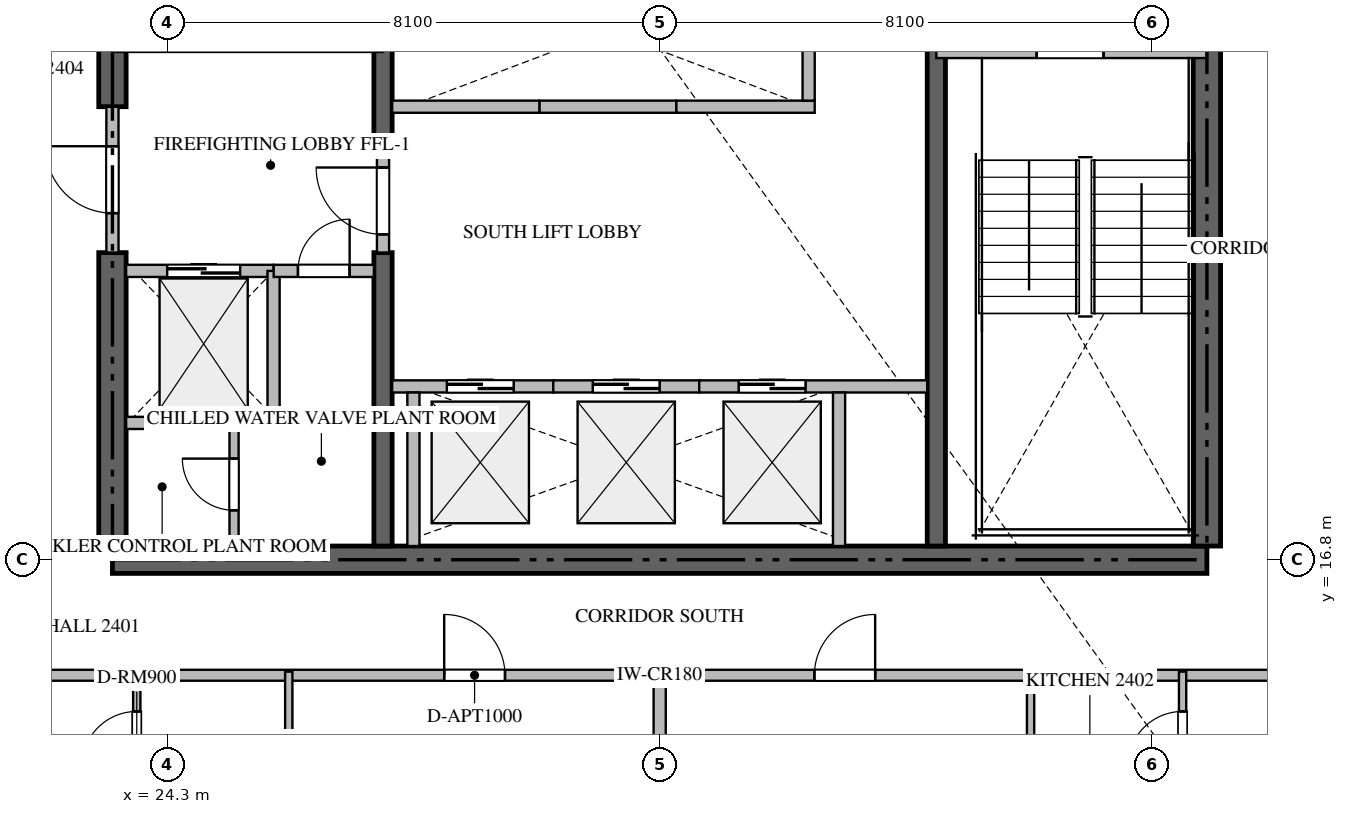
"""IFC4 building model, lengths in metres.
Left out: names, types, materials, properties, quantities, classifications, styles, units other than length and angle.
Written with IfcOpenShell. Run it as: python <this file> out.ifc"""

import sys

from ifc_helpers import new_model, si_unit, direction, frame, frame_2d, origin, place, context, subcontext, project, spatial, rectangle, extrude, source, transform, mapped, element, fill, save


model = new_model("IFC4")
c1 = context("Model", 3, precision=1e-05, world=origin(), true_north=direction((0.0, 1.0)))
c2 = subcontext(c1, "Body", "Model", "MODEL_VIEW")
j1 = project(units=[si_unit("LENGTHUNIT", "METRE"), si_unit("PLANEANGLEUNIT", "RADIAN")], contexts=[c1])
p1 = place(None, origin())
s1 = spatial("IfcSite", under=j1, at=p1, CompositionType="ELEMENT")
p2 = place(p1, origin())
s2 = spatial("IfcBuilding", under=s1, at=p2, CompositionType="ELEMENT")
p3 = place(p2, frame((0.0, 0.0, 97.95)))
s3 = spatial("IfcBuildingStorey", under=s2, at=p3, CompositionType="ELEMENT", Elevation=97.95)
p4 = place(p3, frame((23.4, 16.8, -0.26), z_axis=(0.0, 0.0, 1.0), x_axis=(1.0, 0.0, 0.0)))
e1 = element("IfcWall", 1, at=p4, inside=s3, PredefinedType="SHEAR", context=c2, shape_type="SweptSolid", body=[
    extrude(rectangle(XDim=18.0, YDim=0.45, at=frame_2d((9.0, 0.0))), origin(), (0.0, 0.0, 1.0), 3.748),
])
p5 = place(p3, frame((23.4, 17.025, -0.26), z_axis=(0.0, 0.0, 1.0), x_axis=(0.0, 1.0, 0.0)))
e2 = element("IfcWall", 2, at=p5, inside=s3, PredefinedType="SHEAR", context=c2, shape_type="SweptSolid", body=[
    extrude(rectangle(XDim=4.825, YDim=0.45, at=frame_2d((2.413, 0.0))), origin(), (0.0, 0.0, 1.0), 3.748),
])
p6 = place(p3, frame((23.4, 24.25, -0.26), z_axis=(0.0, 0.0, 1.0), x_axis=(0.0, 1.0, 0.0)))
e3 = element("IfcWall", 3, at=p6, inside=s3, PredefinedType="SHEAR", context=c2, shape_type="SweptSolid", body=[
    extrude(rectangle(XDim=9.125, YDim=0.45, at=frame_2d((4.562, 0.0))), origin(), (0.0, 0.0, 1.0), 3.748),
])
p7 = place(p3, frame((41.4, 17.025, -0.26), z_axis=(0.0, 0.0, 1.0), x_axis=(0.0, 1.0, 0.0)))
e4 = element("IfcWall", 4, at=p7, inside=s3, PredefinedType="SHEAR", context=c2, shape_type="SweptSolid", body=[
    extrude(rectangle(XDim=8.325, YDim=0.45, at=frame_2d((4.163, 0.0))), origin(), (0.0, 0.0, 1.0), 3.748),
])
p8 = place(p3, frame((27.85, 17.025, -0.26), z_axis=(0.0, 0.0, 1.0), x_axis=(0.0, 1.0, 0.0)))
e5 = element("IfcWall", 5, at=p8, inside=s3, PredefinedType="SHEAR", context=c2, shape_type="SweptSolid", body=[
    extrude(rectangle(XDim=4.825, YDim=0.3, at=frame_2d((2.413, 0.0))), origin(), (0.0, 0.0, 1.0), 3.748),
])
p9 = place(p3, frame((27.85, 23.55, -0.26), z_axis=(0.0, 0.0, 1.0), x_axis=(0.0, 1.0, 0.0)))
e6 = element("IfcWall", 6, at=p9, inside=s3, PredefinedType="SHEAR", context=c2, shape_type="SweptSolid", body=[
    extrude(rectangle(XDim=9.825, YDim=0.3, at=frame_2d((4.913, 0.0))), origin(), (0.0, 0.0, 1.0), 3.748),
])
p10 = place(p3, frame((36.95, 17.025, -0.26), z_axis=(0.0, 0.0, 1.0), x_axis=(0.0, 1.0, 0.0)))
e7 = element("IfcWall", 7, at=p10, inside=s3, PredefinedType="SHEAR", context=c2, shape_type="SweptSolid", body=[
    extrude(rectangle(XDim=8.325, YDim=0.3, at=frame_2d((4.163, 0.0))), origin(), (0.0, 0.0, 1.0), 3.748),
])
p11 = place(p3, frame((36.95, 25.15, 0.0), z_axis=(0.0, 0.0, 1.0), x_axis=(1.0, 0.0, 0.0)))
e8 = element("IfcWall", 8, at=p11, inside=s3, PredefinedType="STANDARD", context=c2, shape_type="SweptSolid", body=[
    extrude(rectangle(XDim=4.45, YDim=0.2, at=frame_2d((2.225, 0.0))), origin(), (0.0, 0.0, 1.0), 3.49),
])
p12 = place(p11, frame((1.65, 0.0, 0.0)))
e9 = element("IfcOpeningElement", 9, at=p12, cuts=e8, PredefinedType="OPENING", context=c2, shape_type="SweptSolid", body=[
    extrude(rectangle(XDim=1.1, YDim=2.15, at=frame_2d((0.55, 1.075))), frame((0.0, 0.11, 0.0), z_axis=(0.0, -1.0, 0.0), x_axis=(1.0, 0.0, 0.0)), (0.0, 0.0, 1.0), 0.22),
])
p13 = place(p3, frame((23.625, 21.55, 0.0), z_axis=(0.0, 0.0, 1.0), x_axis=(1.0, 0.0, 0.0)))
e10 = element("IfcWall", 10, at=p13, inside=s3, PredefinedType="STANDARD", context=c2, shape_type="SweptSolid", body=[
    extrude(rectangle(XDim=2.425, YDim=0.2, at=frame_2d((1.212, 0.0))), origin(), (0.0, 0.0, 1.0), 3.49),
])
p14 = place(p13, frame((0.675, 0.0, 0.0)))
e11 = element("IfcOpeningElement", 11, at=p14, cuts=e10, PredefinedType="OPENING", context=c2, shape_type="SweptSolid", body=[
    extrude(rectangle(XDim=1.2, YDim=2.2, at=frame_2d((0.6, 1.1))), frame((0.0, 0.11, 0.0), z_axis=(0.0, -1.0, 0.0), x_axis=(1.0, 0.0, 0.0)), (0.0, 0.0, 1.0), 0.22),
])
p15 = place(p3, frame((28.0, 19.65, 0.0), z_axis=(0.0, 0.0, 1.0), x_axis=(1.0, 0.0, 0.0)))
e12 = element("IfcWall", 12, at=p15, inside=s3, PredefinedType="STANDARD", context=c2, shape_type="SweptSolid", body=[
    extrude(rectangle(XDim=2.65, YDim=0.2, at=frame_2d((1.325, 0.0))), origin(), (0.0, 0.0, 1.0), 3.49),
])
p16 = place(p15, frame((0.9, 0.0, 0.0)))
e13 = element("IfcOpeningElement", 13, at=p16, cuts=e12, PredefinedType="OPENING", context=c2, shape_type="SweptSolid", body=[
    extrude(rectangle(XDim=1.1, YDim=2.2, at=frame_2d((0.55, 1.1))), frame((0.0, 0.11, 0.0), z_axis=(0.0, -1.0, 0.0), x_axis=(1.0, 0.0, 0.0)), (0.0, 0.0, 1.0), 0.22),
])
p17 = place(p3, frame((28.35, 17.025, 0.0), z_axis=(0.0, 0.0, 1.0), x_axis=(0.0, 1.0, 0.0)))
e14 = element("IfcWall", 14, at=p17, inside=s3, PredefinedType="STANDARD", context=c2, shape_type="SweptSolid", body=[
    extrude(rectangle(XDim=2.525, YDim=0.2, at=frame_2d((1.263, 0.0))), origin(), (0.0, 0.0, 1.0), 3.49),
])
p18 = place(p3, frame((30.65, 19.65, 0.0), z_axis=(0.0, 0.0, 1.0), x_axis=(1.0, 0.0, 0.0)))
e15 = element("IfcWall", 15, at=p18, inside=s3, PredefinedType="STANDARD", context=c2, shape_type="SweptSolid", body=[
    extrude(rectangle(XDim=2.4, YDim=0.2, at=frame_2d((1.2, 0.0))), origin(), (0.0, 0.0, 1.0), 3.49),
])
p19 = place(p18, frame((0.65, 0.0, 0.0)))
e16 = element("IfcOpeningElement", 16, at=p19, cuts=e15, PredefinedType="OPENING", context=c2, shape_type="SweptSolid", body=[
    extrude(rectangle(XDim=1.1, YDim=2.2, at=frame_2d((0.55, 1.1))), frame((0.0, 0.11, 0.0), z_axis=(0.0, -1.0, 0.0), x_axis=(1.0, 0.0, 0.0)), (0.0, 0.0, 1.0), 0.22),
])
p20 = place(p3, frame((33.05, 19.65, 0.0), z_axis=(0.0, 0.0, 1.0), x_axis=(1.0, 0.0, 0.0)))
e17 = element("IfcWall", 17, at=p20, inside=s3, PredefinedType="STANDARD", context=c2, shape_type="SweptSolid", body=[
    extrude(rectangle(XDim=3.75, YDim=0.2, at=frame_2d((1.875, 0.0))), origin(), (0.0, 0.0, 1.0), 3.49),
])
p21 = place(p20, frame((0.65, 0.0, 0.0)))
e18 = element("IfcOpeningElement", 18, at=p21, cuts=e17, PredefinedType="OPENING", context=c2, shape_type="SweptSolid", body=[
    extrude(rectangle(XDim=1.1, YDim=2.2, at=frame_2d((0.55, 1.1))), frame((0.0, 0.11, 0.0), z_axis=(0.0, -1.0, 0.0), x_axis=(1.0, 0.0, 0.0)), (0.0, 0.0, 1.0), 0.22),
])
p22 = place(p3, frame((35.35, 17.025, 0.0), z_axis=(0.0, 0.0, 1.0), x_axis=(0.0, 1.0, 0.0)))
e19 = element("IfcWall", 19, at=p22, inside=s3, PredefinedType="STANDARD", context=c2, shape_type="SweptSolid", body=[
    extrude(rectangle(XDim=2.525, YDim=0.2, at=frame_2d((1.263, 0.0))), origin(), (0.0, 0.0, 1.0), 3.49),
])
p23 = place(p3, frame((28.0, 24.25, 0.0), z_axis=(0.0, 0.0, 1.0), x_axis=(1.0, 0.0, 0.0)))
e20 = element("IfcWall", 20, at=p23, inside=s3, PredefinedType="STANDARD", context=c2, shape_type="SweptSolid", body=[
    extrude(rectangle(XDim=2.425, YDim=0.2, at=frame_2d((1.212, 0.0))), origin(), (0.0, 0.0, 1.0), 3.49),
])
p24 = place(p3, frame((30.425, 24.25, 0.0), z_axis=(0.0, 0.0, 1.0), x_axis=(1.0, 0.0, 0.0)))
e21 = element("IfcWall", 21, at=p24, inside=s3, PredefinedType="STANDARD", context=c2, shape_type="SweptSolid", body=[
    extrude(rectangle(XDim=2.25, YDim=0.2, at=frame_2d((1.125, 0.0))), origin(), (0.0, 0.0, 1.0), 3.49),
])
p25 = place(p3, frame((32.675, 24.25, 0.0), z_axis=(0.0, 0.0, 1.0), x_axis=(1.0, 0.0, 0.0)))
e22 = element("IfcWall", 22, at=p25, inside=s3, PredefinedType="STANDARD", context=c2, shape_type="SweptSolid", body=[
    extrude(rectangle(XDim=2.275, YDim=0.2, at=frame_2d((1.137, 0.0))), origin(), (0.0, 0.0, 1.0), 3.49),
])
for number, where, z_axis, x_axis in (
    (23, (34.85, 24.35, 0.0), (0.0, 0.0, 1.0), (0.0, 1.0, 0.0)),
    (24, (26.05, 19.05, 0.0), (0.0, 0.0, 1.0), (0.0, 1.0, 0.0)),
):
    element("IfcWall", number, at=place(p3, frame(where, z_axis=z_axis, x_axis=x_axis)), inside=s3, PredefinedType="STANDARD", context=c2, shape_type="SweptSolid", body=[
        extrude(rectangle(XDim=2.5, YDim=0.2, at=frame_2d((1.25, 0.0))), origin(), (0.0, 0.0, 1.0), 3.49),
    ])
p26 = place(p3, frame((23.625, 19.05, 0.0), z_axis=(0.0, 0.0, 1.0), x_axis=(1.0, 0.0, 0.0)))
e25 = element("IfcWall", 25, at=p26, inside=s3, PredefinedType="STANDARD", context=c2, shape_type="SweptSolid", body=[
    extrude(rectangle(XDim=2.425, YDim=0.2, at=frame_2d((1.212, 0.0))), origin(), (0.0, 0.0, 1.0), 3.49),
])
p27 = place(p3, frame((26.052, 21.55, 0.0), z_axis=(0.0, 0.0, 1.0), x_axis=(1.0, 0.0, 0.0)))
e26 = element("IfcWall", 26, at=p27, inside=s3, PredefinedType="STANDARD", context=c2, shape_type="SweptSolid", body=[
    extrude(rectangle(XDim=1.648, YDim=0.2, at=frame_2d((0.824, 0.0))), origin(), (0.0, 0.0, 1.0), 3.49),
])
p28 = place(p27, frame((0.399, 0.0, 0.0)))
e27 = element("IfcOpeningElement", 27, at=p28, cuts=e26, PredefinedType="OPENING", context=c2, shape_type="SweptSolid", body=[
    extrude(rectangle(XDim=0.85, YDim=2.1, at=frame_2d((0.425, 1.05))), frame((0.0, 0.11, 0.0), z_axis=(0.0, -1.0, 0.0), x_axis=(1.0, 0.0, 0.0)), (0.0, 0.0, 1.0), 0.22),
])
p29 = place(p3, frame((23.4, 21.852, 0.0), z_axis=(0.0, 0.0, 1.0), x_axis=(0.0, 1.0, 0.0)))
e28 = element("IfcWall", 28, at=p29, inside=s3, PredefinedType="STANDARD", context=c2, shape_type="SweptSolid", body=[
    extrude(rectangle(XDim=2.396, YDim=0.2, at=frame_2d((1.198, 0.0))), origin(), (0.0, 0.0, 1.0), 3.49),
])
p30 = place(p29, frame((0.648, 0.0, 0.0)))
e29 = element("IfcOpeningElement", 29, at=p30, cuts=e28, PredefinedType="OPENING", context=c2, shape_type="SweptSolid", body=[
    extrude(rectangle(XDim=1.1, YDim=2.15, at=frame_2d((0.55, 1.075))), frame((0.0, 0.11, 0.0), z_axis=(0.0, -1.0, 0.0), x_axis=(1.0, 0.0, 0.0)), (0.0, 0.0, 1.0), 0.22),
])
p31 = place(p3, frame((27.85, 21.852, 0.0), z_axis=(0.0, 0.0, 1.0), x_axis=(0.0, 1.0, 0.0)))
e30 = element("IfcWall", 30, at=p31, inside=s3, PredefinedType="STANDARD", context=c2, shape_type="SweptSolid", body=[
    extrude(rectangle(XDim=1.696, YDim=0.2, at=frame_2d((0.848, 0.0))), origin(), (0.0, 0.0, 1.0), 3.49),
])
p32 = place(p31, frame((0.298, 0.0, 0.0)))
e31 = element("IfcOpeningElement", 31, at=p32, cuts=e30, PredefinedType="OPENING", context=c2, shape_type="SweptSolid", body=[
    extrude(rectangle(XDim=1.1, YDim=2.15, at=frame_2d((0.55, 1.075))), frame((0.0, 0.11, 0.0), z_axis=(0.0, -1.0, 0.0), x_axis=(1.0, 0.0, 0.0)), (0.0, 0.0, 1.0), 0.22),
])
p33 = place(p3, frame((25.4, 17.025, 0.0), z_axis=(0.0, 0.0, 1.0), x_axis=(0.0, 1.0, 0.0)))
e32 = element("IfcWall", 32, at=p33, inside=s3, PredefinedType="PARTITIONING", context=c2, shape_type="SweptSolid", body=[
    extrude(rectangle(XDim=2.025, YDim=0.15, at=frame_2d((1.013, 0.0))), origin(), (0.0, 0.0, 1.0), 3.49),
])
p34 = place(p33, frame((0.588, 0.0, 0.0)))
e33 = element("IfcOpeningElement", 33, at=p34, cuts=e32, PredefinedType="OPENING", context=c2, shape_type="SweptSolid", body=[
    extrude(rectangle(XDim=0.85, YDim=2.1, at=frame_2d((0.425, 1.05))), frame((0.0, 0.085, 0.0), z_axis=(0.0, -1.0, 0.0), x_axis=(1.0, 0.0, 0.0)), (0.0, 0.0, 1.0), 0.17),
])
p35 = place(p3, frame((32.4, 0.282, 0.0), z_axis=(0.0, 0.0, 1.0), x_axis=(0.0, 1.0, 0.0)))
e34 = element("IfcWall", 34, at=p35, inside=s3, PredefinedType="PARTITIONING", context=c2, shape_type="SweptSolid", body=[
    extrude(rectangle(XDim=14.618, YDim=0.2, at=frame_2d((7.309, 0.0))), origin(), (0.0, 0.0, 1.0), 3.49),
])
p36 = place(p3, frame((21.402, 14.9, 0.0), z_axis=(0.0, 0.0, 1.0), x_axis=(1.0, 0.0, 0.0)))
e35 = element("IfcWall", 35, at=p36, inside=s3, PredefinedType="PARTITIONING", context=c2, shape_type="SweptSolid", body=[
    extrude(rectangle(XDim=21.996, YDim=0.18, at=frame_2d((10.998, 0.0))), origin(), (0.0, 0.0, 1.0), 3.49),
])
p37 = place(p36, frame((7.454, 0.0, 0.0)))
e36 = element("IfcOpeningElement", 36, at=p37, cuts=e35, PredefinedType="OPENING", context=c2, shape_type="SweptSolid", body=[
    extrude(rectangle(XDim=1.0, YDim=2.15, at=frame_2d((0.5, 1.075))), frame((0.0, 0.1, 0.0), z_axis=(0.0, -1.0, 0.0), x_axis=(1.0, 0.0, 0.0)), (0.0, 0.0, 1.0), 0.2),
])
p38 = place(p36, frame((13.542, 0.0, 0.0)))
e37 = element("IfcOpeningElement", 37, at=p38, cuts=e35, PredefinedType="OPENING", context=c2, shape_type="SweptSolid", body=[
    extrude(rectangle(XDim=1.0, YDim=2.15, at=frame_2d((0.5, 1.075))), frame((0.0, 0.1, 0.0), z_axis=(0.0, -1.0, 0.0), x_axis=(1.0, 0.0, 0.0)), (0.0, 0.0, 1.0), 0.2),
])
p39 = place(p3, frame((26.3, 12.15, 0.0), z_axis=(0.0, 0.0, 1.0), x_axis=(0.0, 1.0, 0.0)))
e38 = element("IfcWall", 38, at=p39, inside=s3, PredefinedType="PARTITIONING", context=c2, shape_type="SweptSolid", body=[
    extrude(rectangle(XDim=2.81, YDim=0.12, at=frame_2d((1.405, 0.0))), origin(), (0.0, 0.0, 1.0), 3.49),
])
p40 = place(p3, frame((23.8, 12.75, 0.0), z_axis=(0.0, 0.0, 1.0), x_axis=(0.0, 1.0, 0.0)))
e39 = element("IfcWall", 39, at=p40, inside=s3, PredefinedType="PARTITIONING", context=c2, shape_type="SweptSolid", body=[
    extrude(rectangle(XDim=2.21, YDim=0.12, at=frame_2d((1.105, 0.0))), origin(), (0.0, 0.0, 1.0), 3.49),
])
p41 = place(p40, frame((0.655, 0.0, 0.0)))
e40 = element("IfcOpeningElement", 40, at=p41, cuts=e39, PredefinedType="OPENING", context=c2, shape_type="SweptSolid", body=[
    extrude(rectangle(XDim=0.9, YDim=2.1, at=frame_2d((0.45, 1.05))), frame((0.0, 0.07, 0.0), z_axis=(0.0, -1.0, 0.0), x_axis=(1.0, 0.0, 0.0)), (0.0, 0.0, 1.0), 0.14),
])
p42 = place(p3, frame((38.5, 12.15, 0.0), z_axis=(0.0, 0.0, 1.0), x_axis=(0.0, 1.0, 0.0)))
e41 = element("IfcWall", 41, at=p42, inside=s3, PredefinedType="PARTITIONING", context=c2, shape_type="SweptSolid", body=[
    extrude(rectangle(XDim=2.81, YDim=0.12, at=frame_2d((1.405, 0.0))), origin(), (0.0, 0.0, 1.0), 3.49),
])
p43 = place(p3, frame((41.0, 12.75, 0.0), z_axis=(0.0, 0.0, 1.0), x_axis=(0.0, 1.0, 0.0)))
e42 = element("IfcWall", 42, at=p43, inside=s3, PredefinedType="PARTITIONING", context=c2, shape_type="SweptSolid", body=[
    extrude(rectangle(XDim=2.21, YDim=0.12, at=frame_2d((1.105, 0.0))), origin(), (0.0, 0.0, 1.0), 3.49),
])
p44 = place(p43, frame((0.655, 0.0, 0.0)))
e43 = element("IfcOpeningElement", 43, at=p44, cuts=e42, PredefinedType="OPENING", context=c2, shape_type="SweptSolid", body=[
    extrude(rectangle(XDim=0.9, YDim=2.1, at=frame_2d((0.45, 1.05))), frame((0.0, 0.07, 0.0), z_axis=(0.0, -1.0, 0.0), x_axis=(1.0, 0.0, 0.0)), (0.0, 0.0, 1.0), 0.14),
])
m1 = source(origin(), c2, "Body", "SweptSolid", [
    extrude(rectangle(XDim=1.1, YDim=2.15, at=frame_2d((0.55, 1.075))), frame((0.0, 0.025, 0.0), z_axis=(0.0, -1.0, 0.0), x_axis=(1.0, 0.0, 0.0)), (0.0, 0.0, 1.0), 0.05),
])
p45 = place(p12, origin())
e44 = element("IfcDoor", 44, at=p45, inside=s3, OperationType="SINGLE_SWING_LEFT", PredefinedType="DOOR", context=c2, shape_type="MappedRepresentation", body=[
    mapped(m1, transform((0.0, 0.0, 0.0), scale=1.0)),
])
fill(e9, e44)
m2 = source(origin(), c2, "Body", "SweptSolid", [
    extrude(rectangle(XDim=1.2, YDim=2.2, at=frame_2d((0.6, 1.1))), frame((0.0, 0.025, 0.0), z_axis=(0.0, -1.0, 0.0), x_axis=(1.0, 0.0, 0.0)), (0.0, 0.0, 1.0), 0.05),
])
p46 = place(p14, origin())
e45 = element("IfcDoor", 45, at=p46, inside=s3, OperationType="DOUBLE_DOOR_SLIDING", PredefinedType="DOOR", context=c2, shape_type="MappedRepresentation", body=[
    mapped(m2, transform((0.0, 0.0, 0.0), scale=1.0)),
])
fill(e11, e45)
m3 = source(origin(), c2, "Body", "SweptSolid", [
    extrude(rectangle(XDim=1.1, YDim=2.2, at=frame_2d((0.55, 1.1))), frame((0.0, 0.025, 0.0), z_axis=(0.0, -1.0, 0.0), x_axis=(1.0, 0.0, 0.0)), (0.0, 0.0, 1.0), 0.05),
])
p47 = place(p16, origin())
e46 = element("IfcDoor", 46, at=p47, inside=s3, OperationType="DOUBLE_DOOR_SLIDING", PredefinedType="DOOR", context=c2, shape_type="MappedRepresentation", body=[
    mapped(m3, transform((0.0, 0.0, 0.0), scale=1.0)),
])
fill(e13, e46)
p48 = place(p19, origin())
e47 = element("IfcDoor", 47, at=p48, inside=s3, OperationType="DOUBLE_DOOR_SLIDING", PredefinedType="DOOR", context=c2, shape_type="MappedRepresentation", body=[
    mapped(m3, transform((0.0, 0.0, 0.0), scale=1.0)),
])
fill(e16, e47)
p49 = place(p21, origin())
e48 = element("IfcDoor", 48, at=p49, inside=s3, OperationType="DOUBLE_DOOR_SLIDING", PredefinedType="DOOR", context=c2, shape_type="MappedRepresentation", body=[
    mapped(m3, transform((0.0, 0.0, 0.0), scale=1.0)),
])
fill(e18, e48)
m4 = source(origin(), c2, "Body", "SweptSolid", [
    extrude(rectangle(XDim=0.85, YDim=2.1, at=frame_2d((0.425, 1.05))), frame((0.0, 0.025, 0.0), z_axis=(0.0, -1.0, 0.0), x_axis=(1.0, 0.0, 0.0)), (0.0, 0.0, 1.0), 0.05),
])
p50 = place(p28, origin())
e49 = element("IfcDoor", 49, at=p50, inside=s3, OperationType="SINGLE_SWING_RIGHT", PredefinedType="DOOR", context=c2, shape_type="MappedRepresentation", body=[
    mapped(m4, transform((0.0, 0.0, 0.0), scale=1.0)),
])
fill(e27, e49)
p51 = place(p30, origin())
e50 = element("IfcDoor", 50, at=p51, inside=s3, OperationType="SINGLE_SWING_RIGHT", PredefinedType="DOOR", context=c2, shape_type="MappedRepresentation", body=[
    mapped(m1, transform((0.0, 0.0, 0.0), scale=1.0)),
])
fill(e29, e50)
p52 = place(p32, origin())
e51 = element("IfcDoor", 51, at=p52, inside=s3, OperationType="SINGLE_SWING_RIGHT", PredefinedType="DOOR", context=c2, shape_type="MappedRepresentation", body=[
    mapped(m1, transform((0.0, 0.0, 0.0), scale=1.0)),
])
fill(e31, e51)
p53 = place(p34, origin())
e52 = element("IfcDoor", 52, at=p53, inside=s3, OperationType="SINGLE_SWING_RIGHT", PredefinedType="DOOR", context=c2, shape_type="MappedRepresentation", body=[
    mapped(m4, transform((0.0, 0.0, 0.0), scale=1.0)),
])
fill(e33, e52)
m5 = source(origin(), c2, "Body", "SweptSolid", [
    extrude(rectangle(XDim=1.0, YDim=2.15, at=frame_2d((0.5, 1.075))), frame((0.0, 0.025, 0.0), z_axis=(0.0, -1.0, 0.0), x_axis=(1.0, 0.0, 0.0)), (0.0, 0.0, 1.0), 0.05),
])
p54 = place(p37, origin())
e53 = element("IfcDoor", 53, at=p54, inside=s3, OperationType="SINGLE_SWING_LEFT", PredefinedType="DOOR", context=c2, shape_type="MappedRepresentation", body=[
    mapped(m5, transform((0.0, 0.0, 0.0), scale=1.0)),
])
fill(e36, e53)
p55 = place(p38, origin())
e54 = element("IfcDoor", 54, at=p55, inside=s3, OperationType="SINGLE_SWING_RIGHT", PredefinedType="DOOR", context=c2, shape_type="MappedRepresentation", body=[
    mapped(m5, transform((0.0, 0.0, 0.0), scale=1.0)),
])
fill(e37, e54)
m6 = source(origin(), c2, "Body", "SweptSolid", [
    extrude(rectangle(XDim=0.9, YDim=2.1, at=frame_2d((0.45, 1.05))), frame((0.0, 0.025, 0.0), z_axis=(0.0, -1.0, 0.0), x_axis=(1.0, 0.0, 0.0)), (0.0, 0.0, 1.0), 0.05),
])
p56 = place(p41, origin())
e55 = element("IfcDoor", 55, at=p56, inside=s3, OperationType="SINGLE_SWING_LEFT", PredefinedType="DOOR", context=c2, shape_type="MappedRepresentation", body=[
    mapped(m6, transform((0.0, 0.0, 0.0), scale=1.0)),
])
fill(e40, e55)
p57 = place(p44, origin())
e56 = element("IfcDoor", 56, at=p57, inside=s3, OperationType="SINGLE_SWING_LEFT", PredefinedType="DOOR", context=c2, shape_type="MappedRepresentation", body=[
    mapped(m6, transform((0.0, 0.0, 0.0), scale=1.0)),
])
fill(e43, e56)
save(model, sys.argv[1])
